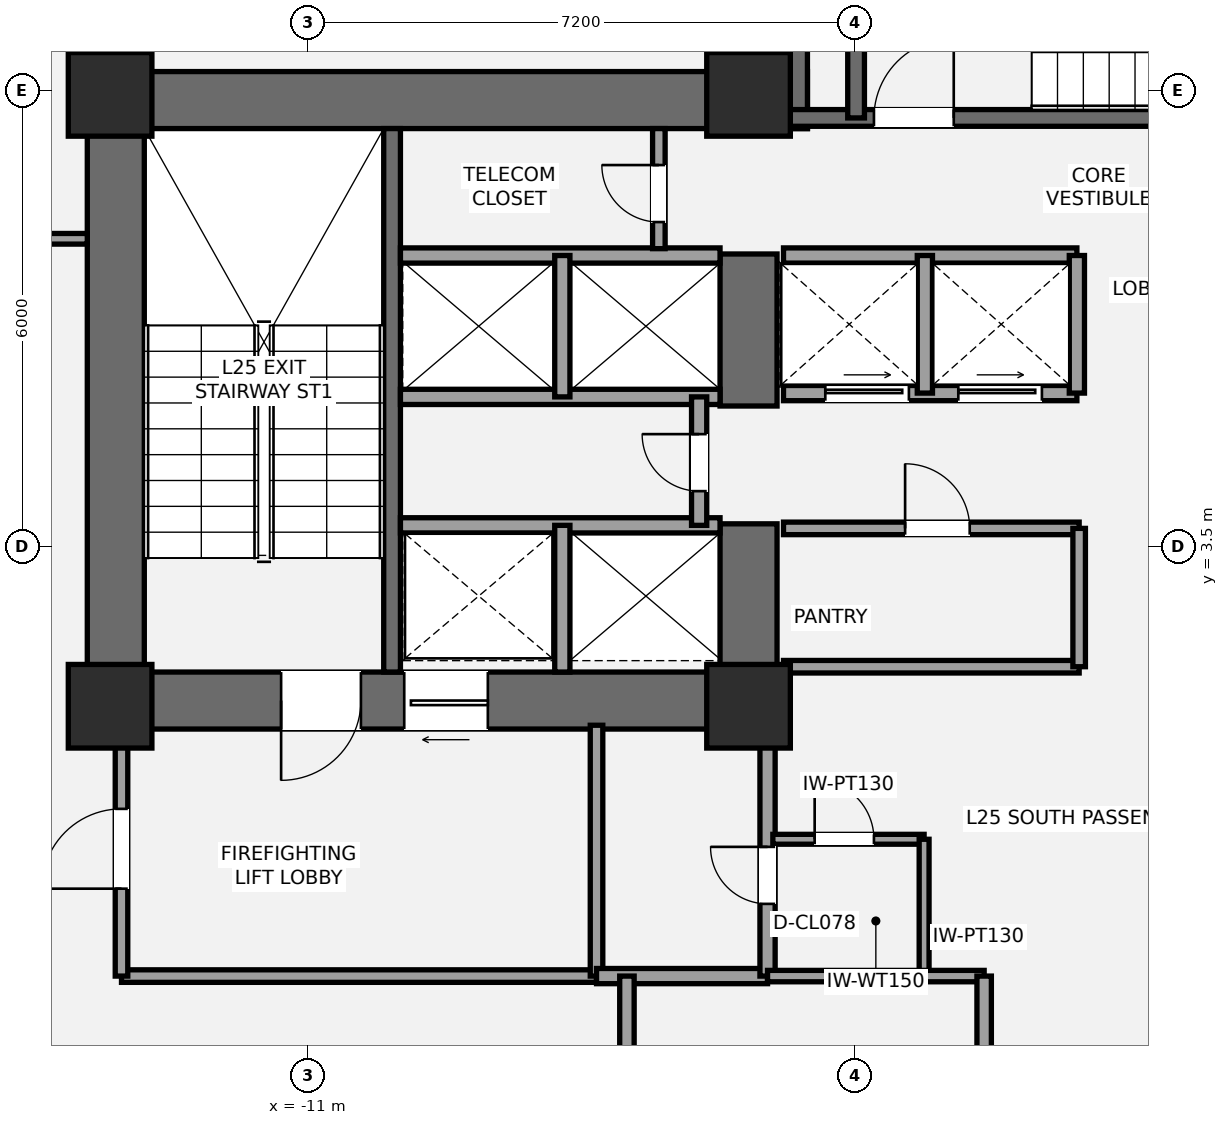
"""IFC4 building model, lengths in metres.
Left out: names, types, materials, properties, quantities, classifications, styles, units other than length and angle.
Written with IfcOpenShell. Run it as: python <this file> out.ifc"""

import sys

from ifc_helpers import new_model, si_unit, direction, frame, frame_2d, origin, origin_2d, place, context, subcontext, project, spatial, rectangle, extrude, element, fill, save


model = new_model("IFC4")
c1 = context("Model", 3, precision=1e-05, world=origin(), true_north=direction((0.0, 1.0)))
c2 = subcontext(c1, "Body", "Model", "MODEL_VIEW")
j1 = project(units=[si_unit("LENGTHUNIT", "METRE"), si_unit("PLANEANGLEUNIT", "RADIAN")], contexts=[c1])
p1 = place(None, origin())
s1 = spatial("IfcSite", under=j1, at=p1, CompositionType="ELEMENT")
p2 = place(p1, origin())
s2 = spatial("IfcBuilding", under=s1, at=p2, CompositionType="ELEMENT")
p3 = place(p2, frame((0.0, 0.0, 96.6)))
s3 = spatial("IfcBuildingStorey", under=s2, at=p3, CompositionType="ELEMENT", Elevation=96.6)
p4 = place(p3, frame((-13.525, 1.1, 0.0), z_axis=(0.0, 0.0, 1.0), x_axis=(0.0, 1.0, 0.0)))
e1 = element("IfcWall", 1, at=p4, inside=s3, PredefinedType="SHEAR", context=c2, shape_type="SweptSolid", body=[
    extrude(rectangle(XDim=8.65, YDim=0.75, at=frame_2d((4.325, 0.0))), origin(), (0.0, 0.0, 1.0), 3.5),
])
p5 = place(p3, frame((-13.9, 9.375, 0.0), z_axis=(0.0, 0.0, 1.0), x_axis=(1.0, 0.0, 0.0)))
e2 = element("IfcWall", 2, at=p5, inside=s3, PredefinedType="SHEAR", context=c2, shape_type="SweptSolid", body=[
    extrude(rectangle(XDim=9.475, YDim=0.75, at=frame_2d((4.737, 0.0))), origin(), (0.0, 0.0, 1.0), 3.5),
])
p6 = place(p3, frame((-4.825, 1.475, 0.0), z_axis=(0.0, 0.0, 1.0), x_axis=(-1.0, 0.0, 0.0)))
e3 = element("IfcWall", 3, at=p6, inside=s3, PredefinedType="SHEAR", context=c2, shape_type="SweptSolid", body=[
    extrude(rectangle(XDim=9.075, YDim=0.75, at=frame_2d((4.538, 0.0))), origin(), (0.0, 0.0, 1.0), 3.5),
])
p7 = place(p6, frame((5.475, 0.0, 0.0)))
e4 = element("IfcOpeningElement", 4, at=p7, cuts=e3, PredefinedType="OPENING", context=c2, shape_type="SweptSolid", body=[
    extrude(rectangle(XDim=1.05, YDim=2.15, at=frame_2d((0.525, 1.075))), frame((0.0, 0.385, 0.0), z_axis=(0.0, -1.0, 0.0), x_axis=(1.0, 0.0, 0.0)), (0.0, 0.0, 1.0), 0.77),
])
p8 = place(p6, frame((3.805, 0.0, 0.0)))
e5 = element("IfcOpeningElement", 5, at=p8, cuts=e3, PredefinedType="OPENING", context=c2, shape_type="SweptSolid", body=[
    extrude(rectangle(XDim=1.1, YDim=2.2, at=frame_2d((0.55, 1.1))), frame((0.0, 0.385, 0.0), z_axis=(0.0, -1.0, 0.0), x_axis=(1.0, 0.0, 0.0)), (0.0, 0.0, 1.0), 0.77),
])
p9 = place(p3, frame((-5.2, 1.1, 0.0), z_axis=(0.0, 0.0, 1.0), x_axis=(0.0, 1.0, 0.0)))
e6 = element("IfcWall", 6, at=p9, inside=s3, PredefinedType="SHEAR", context=c2, shape_type="SweptSolid", body=[
    extrude(rectangle(XDim=2.7, YDim=0.75, at=frame_2d((1.35, 0.0))), origin(), (0.0, 0.0, 1.0), 3.5),
])
p10 = place(p3, frame((-5.2, 5.35, 0.0), z_axis=(0.0, 0.0, 1.0), x_axis=(0.0, 1.0, 0.0)))
e7 = element("IfcWall", 7, at=p10, inside=s3, PredefinedType="SHEAR", context=c2, shape_type="SweptSolid", body=[
    extrude(rectangle(XDim=2.0, YDim=0.75, at=frame_2d((1.0, 0.0))), origin(), (0.0, 0.0, 1.0), 3.5),
])
p11 = place(p3, frame((-9.89, 1.85, 0.0), z_axis=(0.0, 0.0, 1.0), x_axis=(0.0, 1.0, 0.0)))
e8 = element("IfcWall", 8, at=p11, inside=s3, PredefinedType="SHEAR", context=c2, shape_type="SweptSolid", body=[
    extrude(rectangle(XDim=7.15, YDim=0.22, at=frame_2d((3.575, 0.0))), origin(), (0.0, 0.0, 1.0), 3.5),
])
p12 = place(p3, frame((-4.8, 9.0, 0.0), z_axis=(0.0, 0.0, 1.0), x_axis=(0.0, 1.0, 0.0)))
e9 = element("IfcWall", 9, at=p12, inside=s3, PredefinedType="SHEAR", context=c2, shape_type="SweptSolid", body=[
    extrude(rectangle(XDim=4.15, YDim=0.75, at=frame_2d((2.075, 0.0))), origin(), (0.0, 0.0, 1.0), 3.5),
])
p13 = place(p3, frame((-4.7, 9.14, 0.0), z_axis=(0.0, 0.0, 1.0), x_axis=(1.0, 0.0, 0.0)))
e10 = element("IfcWall", 10, at=p13, inside=s3, PredefinedType="SHEAR", context=c2, shape_type="SweptSolid", body=[
    extrude(rectangle(XDim=9.3, YDim=0.22, at=frame_2d((4.65, 0.0))), origin(), (0.0, 0.0, 1.0), 3.5),
])
p14 = place(p13, frame((1.15, 0.0, 0.0)))
e11 = element("IfcOpeningElement", 11, at=p14, cuts=e10, PredefinedType="OPENING", context=c2, shape_type="SweptSolid", body=[
    extrude(rectangle(XDim=1.05, YDim=2.15, at=frame_2d((0.525, 1.075))), frame((0.0, 0.12, 0.0), z_axis=(0.0, -1.0, 0.0), x_axis=(1.0, 0.0, 0.0)), (0.0, 0.0, 1.0), 0.24),
])
p15 = place(p3, frame((-3.785, 9.14, 0.0), z_axis=(0.0, 0.0, 1.0), x_axis=(0.0, 1.0, 0.0)))
e12 = element("IfcWall", 12, at=p15, inside=s3, PredefinedType="SHEAR", context=c2, shape_type="SweptSolid", body=[
    extrude(rectangle(XDim=3.26, YDim=0.22, at=frame_2d((1.63, 0.0))), origin(), (0.0, 0.0, 1.0), 3.5),
])
for number, where, z_axis, x_axis in (
    (13, (-13.6, 1.4, 0.0), (0.0, 0.0, 1.0), (1.0, 0.0, 0.0)),
    (14, (-13.6, 9.45, 0.0), (0.0, 0.0, 1.0), (1.0, 0.0, 0.0)),
    (15, (-5.2, 1.4, 0.0), (0.0, 0.0, 1.0), (1.0, 0.0, 0.0)),
    (16, (-5.2, 9.45, 0.0), (0.0, 0.0, 1.0), (1.0, 0.0, 0.0)),
):
    element("IfcColumn", number, at=place(p3, frame(where, z_axis=z_axis, x_axis=x_axis)), inside=s3, PredefinedType="COLUMN", context=c2, shape_type="SweptSolid", body=[
        extrude(rectangle(XDim=1.1, YDim=1.1, at=origin_2d()), origin(), (0.0, 0.0, 1.0), 3.5),
    ])
p16 = place(p3, frame((-13.45, -2.15, 0.0), z_axis=(0.0, 0.0, 1.0), x_axis=(1.0, 0.0, 0.0)))
e17 = element("IfcWall", 17, at=p16, inside=s3, PredefinedType="PARTITIONING", context=c2, shape_type="SweptSolid", body=[
    extrude(rectangle(XDim=6.25, YDim=0.165, at=frame_2d((3.125, 0.0))), origin(), (0.0, 0.0, 1.0), 2.763),
])
p17 = place(p3, frame((-13.45, -2.15, 0.0), z_axis=(0.0, 0.0, 1.0), x_axis=(0.0, 1.0, 0.0)))
e18 = element("IfcWall", 18, at=p17, inside=s3, PredefinedType="PARTITIONING", context=c2, shape_type="SweptSolid", body=[
    extrude(rectangle(XDim=3.3, YDim=0.165, at=frame_2d((1.65, 0.0))), origin(), (0.0, 0.0, 1.0), 2.763),
])
p18 = place(p17, frame((1.15, 0.0, 0.0)))
e19 = element("IfcOpeningElement", 19, at=p18, cuts=e18, PredefinedType="OPENING", context=c2, shape_type="SweptSolid", body=[
    extrude(rectangle(XDim=1.05, YDim=2.15, at=frame_2d((0.525, 1.075))), frame((0.0, 0.093, 0.0), z_axis=(0.0, -1.0, 0.0), x_axis=(1.0, 0.0, 0.0)), (0.0, 0.0, 1.0), 0.185),
])
p19 = place(p3, frame((-7.2, -2.15, 0.0), z_axis=(0.0, 0.0, 1.0), x_axis=(0.0, 1.0, 0.0)))
e20 = element("IfcWall", 20, at=p19, inside=s3, PredefinedType="PARTITIONING", context=c2, shape_type="SweptSolid", body=[
    extrude(rectangle(XDim=3.3, YDim=0.165, at=frame_2d((1.65, 0.0))), origin(), (0.0, 0.0, 1.0), 2.763),
])
p20 = place(p3, frame((-7.2, -2.15, 0.0), z_axis=(0.0, 0.0, 1.0), x_axis=(1.0, 0.0, 0.0)))
e21 = element("IfcWall", 21, at=p20, inside=s3, PredefinedType="SOLIDWALL", context=c2, shape_type="SweptSolid", body=[
    extrude(rectangle(XDim=2.25, YDim=0.2, at=frame_2d((1.125, 0.0))), origin(), (0.0, 0.0, 1.0), 2.763),
])
p21 = place(p3, frame((-4.95, -2.15, 0.0), z_axis=(0.0, 0.0, 1.0), x_axis=(0.0, 1.0, 0.0)))
e22 = element("IfcWall", 22, at=p21, inside=s3, PredefinedType="SOLIDWALL", context=c2, shape_type="SweptSolid", body=[
    extrude(rectangle(XDim=3.3, YDim=0.2, at=frame_2d((1.65, 0.0))), origin(), (0.0, 0.0, 1.0), 2.763),
])
p22 = place(p21, frame((0.95, 0.0, 0.0)))
e23 = element("IfcOpeningElement", 23, at=p22, cuts=e22, PredefinedType="OPENING", context=c2, shape_type="SweptSolid", body=[
    extrude(rectangle(XDim=0.75, YDim=2.1, at=frame_2d((0.375, 1.05))), frame((0.0, 0.11, 0.0), z_axis=(0.0, -1.0, 0.0), x_axis=(1.0, 0.0, 0.0)), (0.0, 0.0, 1.0), 0.22),
])
p23 = place(p3, frame((-4.88, -0.35, 0.0), z_axis=(0.0, 0.0, 1.0), x_axis=(1.0, 0.0, 0.0)))
e24 = element("IfcWall", 24, at=p23, inside=s3, PredefinedType="PARTITIONING", context=c2, shape_type="SweptSolid", body=[
    extrude(rectangle(XDim=1.99, YDim=0.13, at=frame_2d((0.995, 0.0))), origin(), (0.0, 0.0, 1.0), 2.763),
])
p24 = place(p23, frame((0.55, 0.0, 0.0)))
e25 = element("IfcOpeningElement", 25, at=p24, cuts=e24, PredefinedType="OPENING", context=c2, shape_type="SweptSolid", body=[
    extrude(rectangle(XDim=0.78, YDim=2.1, at=frame_2d((0.39, 1.05))), frame((0.0, 0.075, 0.0), z_axis=(0.0, -1.0, 0.0), x_axis=(1.0, 0.0, 0.0)), (0.0, 0.0, 1.0), 0.15),
])
p25 = place(p3, frame((-2.89, -2.15, 0.0), z_axis=(0.0, 0.0, 1.0), x_axis=(0.0, 1.0, 0.0)))
e26 = element("IfcWall", 26, at=p25, inside=s3, PredefinedType="PARTITIONING", context=c2, shape_type="SweptSolid", body=[
    extrude(rectangle(XDim=1.8, YDim=0.13, at=frame_2d((0.9, 0.0))), origin(), (0.0, 0.0, 1.0), 3.31),
])
p26 = place(p3, frame((-9.78, 3.78, 0.0), z_axis=(0.0, 0.0, 1.0), x_axis=(1.0, 0.0, 0.0)))
e27 = element("IfcWall", 27, at=p26, inside=s3, PredefinedType="SOLIDWALL", context=c2, shape_type="SweptSolid", body=[
    extrude(rectangle(XDim=4.205, YDim=0.2, at=frame_2d((2.103, 0.0))), origin(), (0.0, 0.0, 1.0), 3.31),
])
p27 = place(p3, frame((-7.65, 1.85, 0.0), z_axis=(0.0, 0.0, 1.0), x_axis=(0.0, 1.0, 0.0)))
e28 = element("IfcWall", 28, at=p27, inside=s3, PredefinedType="SOLIDWALL", context=c2, shape_type="SweptSolid", body=[
    extrude(rectangle(XDim=1.93, YDim=0.2, at=frame_2d((0.965, 0.0))), origin(), (0.0, 0.0, 1.0), 3.31),
])
for number, where, z_axis, x_axis in (
    (29, (-9.78, 5.47, 0.0), (0.0, 0.0, 1.0), (1.0, 0.0, 0.0)),
    (30, (-9.78, 7.33, 0.0), (0.0, 0.0, 1.0), (1.0, 0.0, 0.0)),
):
    element("IfcWall", number, at=place(p3, frame(where, z_axis=z_axis, x_axis=x_axis)), inside=s3, PredefinedType="SOLIDWALL", context=c2, shape_type="SweptSolid", body=[
        extrude(rectangle(XDim=4.205, YDim=0.2, at=frame_2d((2.103, 0.0))), origin(), (0.0, 0.0, 1.0), 3.31),
    ])
p28 = place(p3, frame((-7.65, 5.47, 0.0), z_axis=(0.0, 0.0, 1.0), x_axis=(0.0, 1.0, 0.0)))
e31 = element("IfcWall", 31, at=p28, inside=s3, PredefinedType="SOLIDWALL", context=c2, shape_type="SweptSolid", body=[
    extrude(rectangle(XDim=1.86, YDim=0.2, at=frame_2d((0.93, 0.0))), origin(), (0.0, 0.0, 1.0), 3.31),
])
p29 = place(p3, frame((-5.85, 3.78, 0.0), z_axis=(0.0, 0.0, 1.0), x_axis=(0.0, 1.0, 0.0)))
e32 = element("IfcWall", 32, at=p29, inside=s3, PredefinedType="SOLIDWALL", context=c2, shape_type="SweptSolid", body=[
    extrude(rectangle(XDim=1.69, YDim=0.2, at=frame_2d((0.845, 0.0))), origin(), (0.0, 0.0, 1.0), 3.31),
])
p30 = place(p29, frame((0.45, 0.0, 0.0)))
e33 = element("IfcOpeningElement", 33, at=p30, cuts=e32, PredefinedType="OPENING", context=c2, shape_type="SweptSolid", body=[
    extrude(rectangle(XDim=0.75, YDim=2.1, at=frame_2d((0.375, 1.05))), frame((0.0, 0.11, 0.0), z_axis=(0.0, -1.0, 0.0), x_axis=(1.0, 0.0, 0.0)), (0.0, 0.0, 1.0), 0.22),
])
p31 = place(p3, frame((-4.74, 1.92, 0.0), z_axis=(0.0, 0.0, 1.0), x_axis=(1.0, 0.0, 0.0)))
e34 = element("IfcWall", 34, at=p31, inside=s3, PredefinedType="PARTITIONING", context=c2, shape_type="SweptSolid", body=[
    extrude(rectangle(XDim=3.89, YDim=0.165, at=frame_2d((1.945, 0.0))), origin(), (0.0, 0.0, 1.0), 2.3),
])
p32 = place(p3, frame((-4.74, 3.74, 0.0), z_axis=(0.0, 0.0, 1.0), x_axis=(1.0, 0.0, 0.0)))
e35 = element("IfcWall", 35, at=p32, inside=s3, PredefinedType="PARTITIONING", context=c2, shape_type="SweptSolid", body=[
    extrude(rectangle(XDim=3.89, YDim=0.165, at=frame_2d((1.945, 0.0))), origin(), (0.0, 0.0, 1.0), 3.31),
])
p33 = place(p32, frame((1.6, 0.0, 0.0)))
e36 = element("IfcOpeningElement", 36, at=p33, cuts=e35, PredefinedType="OPENING", context=c2, shape_type="SweptSolid", body=[
    extrude(rectangle(XDim=0.85, YDim=2.1, at=frame_2d((0.425, 1.05))), frame((0.0, 0.093, 0.0), z_axis=(0.0, -1.0, 0.0), x_axis=(1.0, 0.0, 0.0)), (0.0, 0.0, 1.0), 0.185),
])
p34 = place(p3, frame((-0.85, 1.92, 0.0), z_axis=(0.0, 0.0, 1.0), x_axis=(0.0, 1.0, 0.0)))
e37 = element("IfcWall", 37, at=p34, inside=s3, PredefinedType="PARTITIONING", context=c2, shape_type="SweptSolid", body=[
    extrude(rectangle(XDim=1.82, YDim=0.165, at=frame_2d((0.91, 0.0))), origin(), (0.0, 0.0, 1.0), 3.31),
])
p35 = place(p3, frame((-4.74, 5.52, 0.0), z_axis=(0.0, 0.0, 1.0), x_axis=(1.0, 0.0, 0.0)))
e38 = element("IfcWall", 38, at=p35, inside=s3, PredefinedType="SOLIDWALL", context=c2, shape_type="SweptSolid", body=[
    extrude(rectangle(XDim=3.86, YDim=0.2, at=frame_2d((1.93, 0.0))), origin(), (0.0, 0.0, 1.0), 3.31),
])
p36 = place(p35, frame((0.55, 0.0, 0.0)))
e39 = element("IfcOpeningElement", 39, at=p36, cuts=e38, PredefinedType="OPENING", context=c2, shape_type="SweptSolid", body=[
    extrude(rectangle(XDim=1.1, YDim=2.2, at=frame_2d((0.55, 1.1))), frame((0.0, 0.11, 0.0), z_axis=(0.0, -1.0, 0.0), x_axis=(1.0, 0.0, 0.0)), (0.0, 0.0, 1.0), 0.22),
])
p37 = place(p35, frame((2.3, 0.0, 0.0)))
e40 = element("IfcOpeningElement", 40, at=p37, cuts=e38, PredefinedType="OPENING", context=c2, shape_type="SweptSolid", body=[
    extrude(rectangle(XDim=1.1, YDim=2.2, at=frame_2d((0.55, 1.1))), frame((0.0, 0.11, 0.0), z_axis=(0.0, -1.0, 0.0), x_axis=(1.0, 0.0, 0.0)), (0.0, 0.0, 1.0), 0.22),
])
p38 = place(p3, frame((-4.74, 7.33, 0.0), z_axis=(0.0, 0.0, 1.0), x_axis=(1.0, 0.0, 0.0)))
e41 = element("IfcWall", 41, at=p38, inside=s3, PredefinedType="SOLIDWALL", context=c2, shape_type="SweptSolid", body=[
    extrude(rectangle(XDim=3.86, YDim=0.2, at=frame_2d((1.93, 0.0))), origin(), (0.0, 0.0, 1.0), 3.31),
])
for number, where, z_axis, x_axis in (
    (42, (-2.88, 5.52, 0.0), (0.0, 0.0, 1.0), (0.0, 1.0, 0.0)),
    (43, (-0.88, 5.52, 0.0), (0.0, 0.0, 1.0), (0.0, 1.0, 0.0)),
):
    element("IfcWall", number, at=place(p3, frame(where, z_axis=z_axis, x_axis=x_axis)), inside=s3, PredefinedType="SOLIDWALL", context=c2, shape_type="SweptSolid", body=[
        extrude(rectangle(XDim=1.81, YDim=0.2, at=frame_2d((0.905, 0.0))), origin(), (0.0, 0.0, 1.0), 3.31),
    ])
p39 = place(p3, frame((-6.38, 7.42, 0.0), z_axis=(0.0, 0.0, 1.0), x_axis=(0.0, 1.0, 0.0)))
e44 = element("IfcWall", 44, at=p39, inside=s3, PredefinedType="PARTITIONING", context=c2, shape_type="SweptSolid", body=[
    extrude(rectangle(XDim=1.58, YDim=0.165, at=frame_2d((0.79, 0.0))), origin(), (0.0, 0.0, 1.0), 3.31),
])
p40 = place(p39, frame((0.35, 0.0, 0.0)))
e45 = element("IfcOpeningElement", 45, at=p40, cuts=e44, PredefinedType="OPENING", context=c2, shape_type="SweptSolid", body=[
    extrude(rectangle(XDim=0.75, YDim=2.1, at=frame_2d((0.375, 1.05))), frame((0.0, 0.093, 0.0), z_axis=(0.0, -1.0, 0.0), x_axis=(1.0, 0.0, 0.0)), (0.0, 0.0, 1.0), 0.185),
])
p41 = place(p3, frame((-4.95, -2.15, 0.0), z_axis=(0.0, 0.0, 1.0), x_axis=(1.0, 0.0, 0.0)))
e46 = element("IfcWall", 46, at=p41, inside=s3, PredefinedType="PLUMBINGWALL", context=c2, shape_type="SweptSolid", body=[
    extrude(rectangle(XDim=2.85, YDim=0.15, at=frame_2d((1.425, 0.0))), origin(), (0.0, 0.0, 1.0), 2.763),
])
p42 = place(p3, frame((-6.8, -4.05, 0.0), z_axis=(0.0, 0.0, 1.0), x_axis=(0.0, 1.0, 0.0)))
e47 = element("IfcWall", 47, at=p42, inside=s3, PredefinedType="PLUMBINGWALL", context=c2, shape_type="SweptSolid", body=[
    extrude(rectangle(XDim=1.9, YDim=0.19, at=frame_2d((0.95, 0.0))), origin(), (0.0, 0.0, 1.0), 2.763),
])
p43 = place(p3, frame((-2.1, -4.05, 0.0), z_axis=(0.0, 0.0, 1.0), x_axis=(0.0, 1.0, 0.0)))
e48 = element("IfcWall", 48, at=p43, inside=s3, PredefinedType="PLUMBINGWALL", context=c2, shape_type="SweptSolid", body=[
    extrude(rectangle(XDim=1.9, YDim=0.19, at=frame_2d((0.95, 0.0))), origin(), (0.0, 0.0, 1.0), 3.31),
])
p44 = place(p3, frame((-15.7, 7.55, 0.0), z_axis=(0.0, 0.0, 1.0), x_axis=(1.0, 0.0, 0.0)))
e49 = element("IfcWall", 49, at=p44, inside=s3, PredefinedType="PARTITIONING", context=c2, shape_type="SweptSolid", body=[
    extrude(rectangle(XDim=1.8, YDim=0.14, at=frame_2d((0.9, 0.0))), origin(), (0.0, 0.0, 1.0), 3.31),
])
p45 = place(p44, frame((0.32, 0.0, 0.0)))
e50 = element("IfcOpeningElement", 50, at=p45, cuts=e49, PredefinedType="OPENING", context=c2, shape_type="SweptSolid", body=[
    extrude(rectangle(XDim=0.92, YDim=2.15, at=frame_2d((0.46, 1.075))), frame((0.0, 0.08, 0.0), z_axis=(0.0, -1.0, 0.0), x_axis=(1.0, 0.0, 0.0)), (0.0, 0.0, 1.0), 0.16),
])
p46 = place(p7, origin())
e51 = element("IfcDoor", 51, at=p46, inside=s3, OperationType="SINGLE_SWING_RIGHT", PredefinedType="DOOR", context=c2, shape_type="SweptSolid", body=[
    extrude(rectangle(XDim=1.05, YDim=2.15, at=frame_2d((0.525, 1.075))), frame((0.0, 0.025, 0.0), z_axis=(0.0, -1.0, 0.0), x_axis=(1.0, 0.0, 0.0)), (0.0, 0.0, 1.0), 0.05),
])
fill(e4, e51)
p47 = place(p14, origin())
e52 = element("IfcDoor", 52, at=p47, inside=s3, OperationType="SINGLE_SWING_RIGHT", PredefinedType="DOOR", context=c2, shape_type="SweptSolid", body=[
    extrude(rectangle(XDim=1.05, YDim=2.15, at=frame_2d((0.525, 1.075))), frame((0.0, 0.025, 0.0), z_axis=(0.0, -1.0, 0.0), x_axis=(1.0, 0.0, 0.0)), (0.0, 0.0, 1.0), 0.05),
])
fill(e11, e52)
p48 = place(p18, origin())
e53 = element("IfcDoor", 53, at=p48, inside=s3, OperationType="SINGLE_SWING_LEFT", PredefinedType="DOOR", context=c2, shape_type="SweptSolid", body=[
    extrude(rectangle(XDim=1.05, YDim=2.15, at=frame_2d((0.525, 1.075))), frame((0.0, 0.025, 0.0), z_axis=(0.0, -1.0, 0.0), x_axis=(1.0, 0.0, 0.0)), (0.0, 0.0, 1.0), 0.05),
])
fill(e19, e53)
p49 = place(p22, origin())
e54 = element("IfcDoor", 54, at=p49, inside=s3, OperationType="SINGLE_SWING_RIGHT", PredefinedType="DOOR", context=c2, shape_type="SweptSolid", body=[
    extrude(rectangle(XDim=0.75, YDim=2.1, at=frame_2d((0.375, 1.05))), frame((0.0, 0.025, 0.0), z_axis=(0.0, -1.0, 0.0), x_axis=(1.0, 0.0, 0.0)), (0.0, 0.0, 1.0), 0.05),
])
fill(e23, e54)
p50 = place(p24, origin())
e55 = element("IfcDoor", 55, at=p50, inside=s3, OperationType="SINGLE_SWING_LEFT", PredefinedType="DOOR", context=c2, shape_type="SweptSolid", body=[
    extrude(rectangle(XDim=0.78, YDim=2.1, at=frame_2d((0.39, 1.05))), frame((0.0, 0.025, 0.0), z_axis=(0.0, -1.0, 0.0), x_axis=(1.0, 0.0, 0.0)), (0.0, 0.0, 1.0), 0.05),
])
fill(e25, e55)
p51 = place(p8, origin())
e56 = element("IfcDoor", 56, at=p51, inside=s3, OperationType="SLIDING_TO_LEFT", PredefinedType="DOOR", context=c2, shape_type="SweptSolid", body=[
    extrude(rectangle(XDim=1.1, YDim=2.2, at=frame_2d((0.55, 1.1))), frame((0.0, 0.025, 0.0), z_axis=(0.0, -1.0, 0.0), x_axis=(1.0, 0.0, 0.0)), (0.0, 0.0, 1.0), 0.05),
])
fill(e5, e56)
p52 = place(p30, origin())
e57 = element("IfcDoor", 57, at=p52, inside=s3, OperationType="SINGLE_SWING_RIGHT", PredefinedType="DOOR", context=c2, shape_type="SweptSolid", body=[
    extrude(rectangle(XDim=0.75, YDim=2.1, at=frame_2d((0.375, 1.05))), frame((0.0, 0.025, 0.0), z_axis=(0.0, -1.0, 0.0), x_axis=(1.0, 0.0, 0.0)), (0.0, 0.0, 1.0), 0.05),
])
fill(e33, e57)
p53 = place(p33, origin())
e58 = element("IfcDoor", 58, at=p53, inside=s3, OperationType="SINGLE_SWING_LEFT", PredefinedType="DOOR", context=c2, shape_type="SweptSolid", body=[
    extrude(rectangle(XDim=0.85, YDim=2.1, at=frame_2d((0.425, 1.05))), frame((0.0, 0.025, 0.0), z_axis=(0.0, -1.0, 0.0), x_axis=(1.0, 0.0, 0.0)), (0.0, 0.0, 1.0), 0.05),
])
fill(e36, e58)
p54 = place(p36, origin())
e59 = element("IfcDoor", 59, at=p54, inside=s3, OperationType="SLIDING_TO_LEFT", PredefinedType="DOOR", context=c2, shape_type="SweptSolid", body=[
    extrude(rectangle(XDim=1.1, YDim=2.2, at=frame_2d((0.55, 1.1))), frame((0.0, 0.025, 0.0), z_axis=(0.0, -1.0, 0.0), x_axis=(1.0, 0.0, 0.0)), (0.0, 0.0, 1.0), 0.05),
])
fill(e39, e59)
p55 = place(p37, origin())
e60 = element("IfcDoor", 60, at=p55, inside=s3, OperationType="SLIDING_TO_LEFT", PredefinedType="DOOR", context=c2, shape_type="SweptSolid", body=[
    extrude(rectangle(XDim=1.1, YDim=2.2, at=frame_2d((0.55, 1.1))), frame((0.0, 0.025, 0.0), z_axis=(0.0, -1.0, 0.0), x_axis=(1.0, 0.0, 0.0)), (0.0, 0.0, 1.0), 0.05),
])
fill(e40, e60)
p56 = place(p40, origin())
e61 = element("IfcDoor", 61, at=p56, inside=s3, OperationType="SINGLE_SWING_RIGHT", PredefinedType="DOOR", context=c2, shape_type="SweptSolid", body=[
    extrude(rectangle(XDim=0.75, YDim=2.1, at=frame_2d((0.375, 1.05))), frame((0.0, 0.025, 0.0), z_axis=(0.0, -1.0, 0.0), x_axis=(1.0, 0.0, 0.0)), (0.0, 0.0, 1.0), 0.05),
])
fill(e45, e61)
save(model, sys.argv[1])
